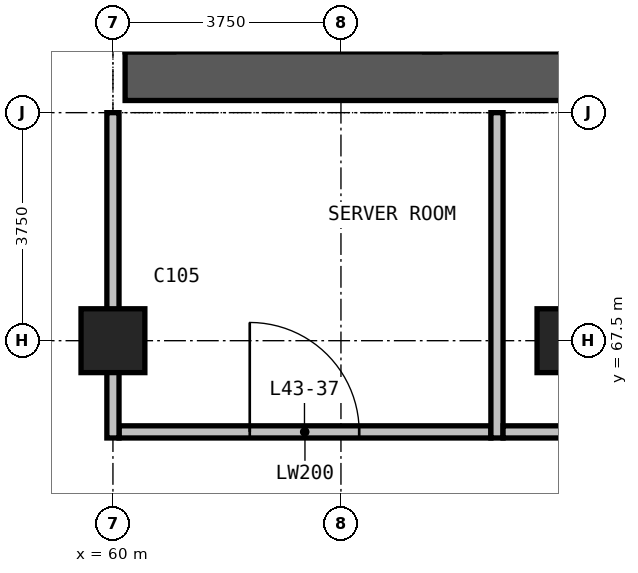
"""IFC4 building model, lengths in metres.
Left out: names, types, materials, properties, quantities, classifications, styles, units other than length and angle.
Written with IfcOpenShell. Run it as: python <this file> out.ifc"""

import sys

from ifc_helpers import new_model, si_unit, direction, frame, frame_2d, origin, origin_2d, place, context, subcontext, project, spatial, rectangle, extrude, element, fill, save


model = new_model("IFC4")
c1 = context("Model", 3, precision=1e-05, world=origin(), true_north=direction((0.0, 1.0)))
c2 = subcontext(c1, "Body", "Model", "MODEL_VIEW")
j1 = project(units=[si_unit("LENGTHUNIT", "METRE"), si_unit("PLANEANGLEUNIT", "RADIAN")], contexts=[c1])
p1 = place(None, origin())
s1 = spatial("IfcSite", under=j1, at=p1, CompositionType="ELEMENT")
p2 = place(p1, origin())
s2 = spatial("IfcBuilding", under=s1, at=p2, CompositionType="ELEMENT")
p3 = place(p2, frame((0.0, 0.0, 169.3)))
s3 = spatial("IfcBuildingStorey", under=s2, at=p3, CompositionType="ELEMENT", Elevation=169.3)
for number, where, z_axis, x_axis in (
    (1, (60.0, 67.5, 0.0), (0.0, 0.0, 1.0), (1.0, 0.0, 0.0)),
    (2, (67.5, 67.5, 0.0), (0.0, 0.0, 1.0), (1.0, 0.0, 0.0)),
):
    element("IfcColumn", number, at=place(p3, frame(where, z_axis=z_axis, x_axis=x_axis)), inside=s3, PredefinedType="COLUMN", context=c2, shape_type="SweptSolid", body=[
        extrude(rectangle(XDim=1.05, YDim=1.05, at=origin_2d()), origin(), (0.0, 0.0, 1.0), 3.6),
    ])
p4 = place(p3, frame((60.2, 71.85, 0.0), z_axis=(0.0, 0.0, 1.0), x_axis=(1.0, 0.0, 0.0)))
e3 = element("IfcWall", 3, at=p4, inside=s3, PredefinedType="SHEAR", context=c2, shape_type="SweptSolid", body=[
    extrude(rectangle(XDim=29.6, YDim=0.8, at=frame_2d((14.8, 0.0))), origin(), (0.0, 0.0, 1.0), 3.6),
])
p5 = place(p3, frame((60.1, 66.0, 0.0), z_axis=(0.0, 0.0, 1.0), x_axis=(1.0, 0.0, 0.0)))
e4 = element("IfcWall", 4, at=p5, inside=s3, PredefinedType="PARTITIONING", context=c2, shape_type="SweptSolid", body=[
    extrude(rectangle(XDim=6.116, YDim=0.2, at=frame_2d((3.058, 0.0))), origin(), (0.0, 0.0, 1.0), 3.3),
])
p6 = place(p5, frame((2.15, 0.0, 0.0)))
e5 = element("IfcOpeningElement", 5, at=p6, cuts=e4, PredefinedType="OPENING", context=c2, shape_type="SweptSolid", body=[
    extrude(rectangle(XDim=1.8, YDim=2.4, at=frame_2d((0.9, 1.2))), frame((0.0, 0.11, 0.0), z_axis=(0.0, -1.0, 0.0), x_axis=(1.0, 0.0, 0.0)), (0.0, 0.0, 1.0), 0.22),
])
for number, where, z_axis, x_axis in (
    (6, (60.0, 65.9, 0.0), (0.0, 0.0, 1.0), (0.0, 1.0, 0.0)),
    (7, (66.316, 65.9, 0.0), (0.0, 0.0, 1.0), (0.0, 1.0, 0.0)),
):
    element("IfcWall", number, at=place(p3, frame(where, z_axis=z_axis, x_axis=x_axis)), inside=s3, PredefinedType="PARTITIONING", context=c2, shape_type="SweptSolid", body=[
        extrude(rectangle(XDim=5.35, YDim=0.2, at=frame_2d((2.675, 0.0))), origin(), (0.0, 0.0, 1.0), 3.3),
    ])
p7 = place(p3, frame((66.416, 66.0, 0.0), z_axis=(0.0, 0.0, 1.0), x_axis=(1.0, 0.0, 0.0)))
e8 = element("IfcWall", 8, at=p7, inside=s3, PredefinedType="PARTITIONING", context=c2, shape_type="SweptSolid", body=[
    extrude(rectangle(XDim=23.484, YDim=0.2, at=frame_2d((11.742, 0.0))), origin(), (0.0, 0.0, 1.0), 3.3),
])
p8 = place(p7, frame((7.05, 0.0, 0.0)))
e9 = element("IfcOpeningElement", 9, at=p8, cuts=e8, PredefinedType="OPENING", context=c2, shape_type="SweptSolid", body=[
    extrude(rectangle(XDim=1.0, YDim=2.2, at=frame_2d((0.5, 1.1))), frame((0.0, 0.11, 0.0), z_axis=(0.0, -1.0, 0.0), x_axis=(1.0, 0.0, 0.0)), (0.0, 0.0, 1.0), 0.22),
])
p9 = place(p7, frame((19.089, 0.0, 0.0)))
e10 = element("IfcOpeningElement", 10, at=p9, cuts=e8, PredefinedType="OPENING", context=c2, shape_type="SweptSolid", body=[
    extrude(rectangle(XDim=1.0, YDim=2.2, at=frame_2d((0.5, 1.1))), frame((0.0, 0.11, 0.0), z_axis=(0.0, -1.0, 0.0), x_axis=(1.0, 0.0, 0.0)), (0.0, 0.0, 1.0), 0.22),
])
p10 = place(p6, origin())
e11 = element("IfcDoor", 11, at=p10, inside=s3, OperationType="DOUBLE_DOOR_SINGLE_SWING", PredefinedType="DOOR", context=c2, shape_type="SweptSolid", body=[
    extrude(rectangle(XDim=1.8, YDim=2.4, at=frame_2d((0.9, 1.2))), frame((0.0, 0.025, 0.0), z_axis=(0.0, -1.0, 0.0), x_axis=(1.0, 0.0, 0.0)), (0.0, 0.0, 1.0), 0.05),
])
fill(e5, e11)
save(model, sys.argv[1])
